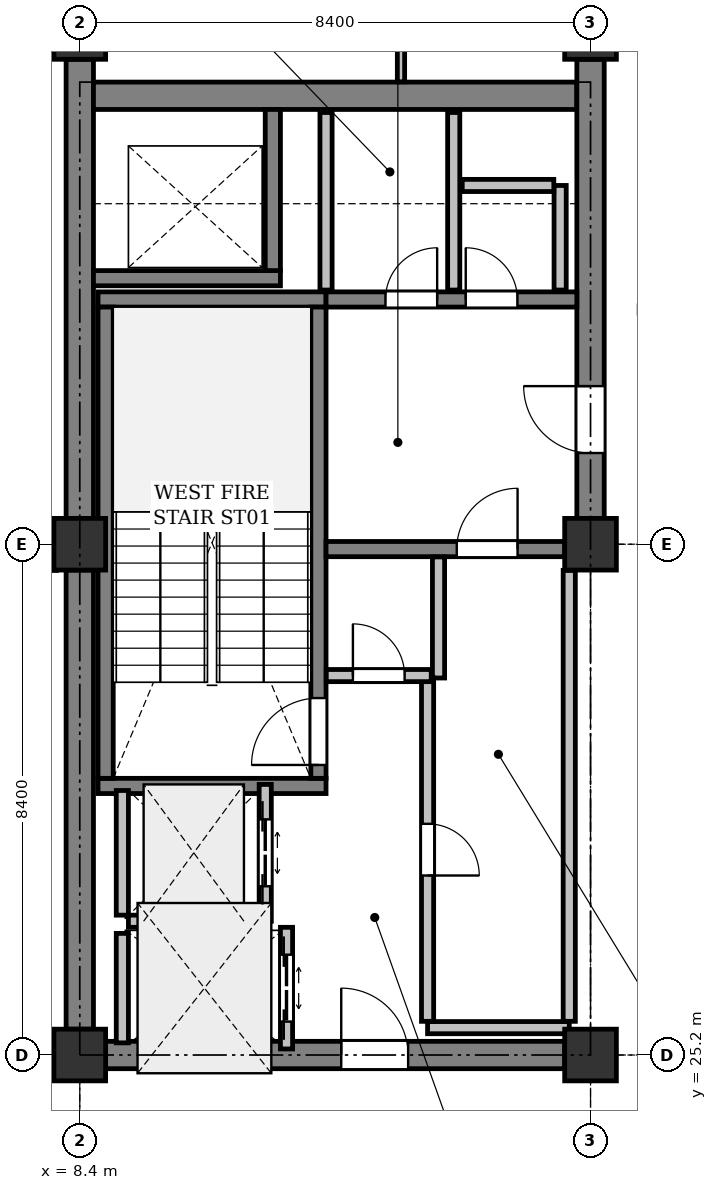
"""IFC4 building model, lengths in metres.
Left out: names, types, materials, properties, quantities, classifications, styles, units other than length and angle.
Written with IfcOpenShell. Run it as: python <this file> out.ifc"""

import sys

from ifc_helpers import new_model, si_unit, direction, frame, frame_2d, origin, origin_2d, place, context, subcontext, project, spatial, rectangle, extrude, element, fill, save


model = new_model("IFC4")
c1 = context("Model", 3, precision=1e-05, world=origin(), true_north=direction((0.0, 1.0)))
c2 = subcontext(c1, "Body", "Model", "MODEL_VIEW")
j1 = project(units=[si_unit("LENGTHUNIT", "METRE"), si_unit("PLANEANGLEUNIT", "RADIAN")], contexts=[c1])
p1 = place(None, origin())
s1 = spatial("IfcSite", under=j1, at=p1, CompositionType="ELEMENT")
p2 = place(p1, origin())
s2 = spatial("IfcBuilding", under=s1, at=p2, CompositionType="ELEMENT")
p3 = place(p2, frame((0.0, 0.0, 314.2)))
s3 = spatial("IfcBuildingStorey", under=s2, at=p3, CompositionType="ELEMENT", Elevation=314.2)
for number, where, z_axis, x_axis in (
    (1, (8.4, 25.2, 0.0), (0.0, 0.0, 1.0), (1.0, 0.0, 0.0)),
    (2, (8.4, 33.6, 0.0), (0.0, 0.0, 1.0), (1.0, 0.0, 0.0)),
    (3, (8.4, 42.0, 0.0), (0.0, 0.0, 1.0), (1.0, 0.0, 0.0)),
    (4, (16.8, 25.2, 0.0), (0.0, 0.0, 1.0), (1.0, 0.0, 0.0)),
    (5, (16.8, 33.6, 0.0), (0.0, 0.0, 1.0), (1.0, 0.0, 0.0)),
    (6, (16.8, 42.0, 0.0), (0.0, 0.0, 1.0), (1.0, 0.0, 0.0)),
):
    element("IfcColumn", number, at=place(p3, frame(where, z_axis=z_axis, x_axis=x_axis)), inside=s3, PredefinedType="COLUMN", context=c2, shape_type="SweptSolid", body=[
        extrude(rectangle(XDim=0.85, YDim=0.85, at=origin_2d()), origin(), (0.0, 0.0, 1.0), 4.0),
    ])
for number, where, z_axis, x_axis in (
    (7, (8.4, 25.625, 0.0), (0.0, 0.0, 1.0), (0.0, 1.0, 0.0)),
    (8, (8.4, 34.025, 0.0), (0.0, 0.0, 1.0), (0.0, 1.0, 0.0)),
):
    element("IfcWall", number, at=place(p3, frame(where, z_axis=z_axis, x_axis=x_axis)), inside=s3, PredefinedType="SHEAR", context=c2, shape_type="SweptSolid", body=[
        extrude(rectangle(XDim=7.55, YDim=0.45, at=frame_2d((3.775, 0.0))), origin(), (0.0, 0.0, 1.0), 3.725),
    ])
p4 = place(p3, frame((8.625, 40.975, 0.0), z_axis=(0.0, 0.0, 1.0), x_axis=(1.0, 0.0, 0.0)))
e9 = element("IfcWall", 9, at=p4, inside=s3, PredefinedType="SHEAR", context=c2, shape_type="SweptSolid", body=[
    extrude(rectangle(XDim=7.95, YDim=0.45, at=frame_2d((3.975, 0.0))), origin(), (0.0, 0.0, 1.0), 3.725),
])
p5 = place(p3, frame((16.8, 34.025, 0.0), z_axis=(0.0, 0.0, 1.0), x_axis=(0.0, 1.0, 0.0)))
e10 = element("IfcWall", 10, at=p5, inside=s3, PredefinedType="SHEAR", context=c2, shape_type="SweptSolid", body=[
    extrude(rectangle(XDim=7.55, YDim=0.45, at=frame_2d((3.775, 0.0))), origin(), (0.0, 0.0, 1.0), 3.725),
])
p6 = place(p5, frame((1.075, 0.0, 0.0)))
e11 = element("IfcOpeningElement", 11, at=p6, cuts=e10, PredefinedType="OPENING", context=c2, shape_type="SweptSolid", body=[
    extrude(rectangle(XDim=1.1, YDim=2.15, at=frame_2d((0.55, 1.075))), frame((0.0, 0.235, 0.0), z_axis=(0.0, -1.0, 0.0), x_axis=(1.0, 0.0, 0.0)), (0.0, 0.0, 1.0), 0.47),
])
p7 = place(p3, frame((8.825, 25.2, 0.0), z_axis=(0.0, 0.0, 1.0), x_axis=(1.0, 0.0, 0.0)))
e12 = element("IfcWall", 12, at=p7, inside=s3, PredefinedType="SHEAR", context=c2, shape_type="SweptSolid", body=[
    extrude(rectangle(XDim=7.55, YDim=0.45, at=frame_2d((3.775, 0.0))), origin(), (0.0, 0.0, 1.0), 3.725),
])
p8 = place(p7, frame((3.875, 0.0, 0.0)))
e13 = element("IfcOpeningElement", 13, at=p8, cuts=e12, PredefinedType="OPENING", context=c2, shape_type="SweptSolid", body=[
    extrude(rectangle(XDim=1.1, YDim=2.15, at=frame_2d((0.55, 1.075))), frame((0.0, 0.235, 0.0), z_axis=(0.0, -1.0, 0.0), x_axis=(1.0, 0.0, 0.0)), (0.0, 0.0, 1.0), 0.47),
])
for number, where, z_axis, x_axis in (
    (14, (12.45, 29.625, 0.0), (0.0, 0.0, 1.0), (-1.0, 0.0, 0.0)),
    (15, (12.45, 37.625, 0.0), (0.0, 0.0, 1.0), (-1.0, 0.0, 0.0)),
):
    element("IfcWall", number, at=place(p3, frame(where, z_axis=z_axis, x_axis=x_axis)), inside=s3, PredefinedType="SHEAR", context=c2, shape_type="SweptSolid", body=[
        extrude(rectangle(XDim=3.75, YDim=0.25, at=frame_2d((1.875, 0.0))), origin(), (0.0, 0.0, 1.0), 3.725),
    ])
p9 = place(p3, frame((12.325, 29.75, 0.0), z_axis=(0.0, 0.0, 1.0), x_axis=(0.0, 1.0, 0.0)))
e16 = element("IfcWall", 16, at=p9, inside=s3, PredefinedType="SHEAR", context=c2, shape_type="SweptSolid", body=[
    extrude(rectangle(XDim=7.75, YDim=0.25, at=frame_2d((3.875, 0.0))), origin(), (0.0, 0.0, 1.0), 3.725),
])
p10 = place(p9, frame((0.22, 0.0, 0.0)))
e17 = element("IfcOpeningElement", 17, at=p10, cuts=e16, PredefinedType="OPENING", context=c2, shape_type="SweptSolid", body=[
    extrude(rectangle(XDim=1.1, YDim=2.15, at=frame_2d((0.55, 1.075))), frame((0.0, 0.135, 0.0), z_axis=(0.0, -1.0, 0.0), x_axis=(1.0, 0.0, 0.0)), (0.0, 0.0, 1.0), 0.27),
])
p11 = place(p3, frame((8.825, 29.75, 0.0), z_axis=(0.0, 0.0, 1.0), x_axis=(0.0, 1.0, 0.0)))
e18 = element("IfcWall", 18, at=p11, inside=s3, PredefinedType="SHEAR", context=c2, shape_type="SweptSolid", body=[
    extrude(rectangle(XDim=7.75, YDim=0.25, at=frame_2d((3.875, 0.0))), origin(), (0.0, 0.0, 1.0), 3.725),
])
p12 = place(p3, frame((8.625, 37.975, 0.0), z_axis=(0.0, 0.0, 1.0), x_axis=(1.0, 0.0, 0.0)))
e19 = element("IfcWall", 19, at=p12, inside=s3, PredefinedType="SHEAR", context=c2, shape_type="SweptSolid", body=[
    extrude(rectangle(XDim=3.075, YDim=0.25, at=frame_2d((1.538, 0.0))), origin(), (0.0, 0.0, 1.0), 3.725),
])
p13 = place(p3, frame((11.575, 38.1, 0.0), z_axis=(0.0, 0.0, 1.0), x_axis=(0.0, 1.0, 0.0)))
e20 = element("IfcWall", 20, at=p13, inside=s3, PredefinedType="SHEAR", context=c2, shape_type="SweptSolid", body=[
    extrude(rectangle(XDim=2.65, YDim=0.25, at=frame_2d((1.325, 0.0))), origin(), (0.0, 0.0, 1.0), 3.725),
])
p14 = place(p3, frame((12.45, 33.52, 0.0), z_axis=(0.0, 0.0, 1.0), x_axis=(1.0, 0.0, 0.0)))
e21 = element("IfcWall", 21, at=p14, inside=s3, PredefinedType="SHEAR", context=c2, shape_type="SweptSolid", body=[
    extrude(rectangle(XDim=3.925, YDim=0.25, at=frame_2d((1.962, 0.0))), origin(), (0.0, 0.0, 1.0), 3.725),
])
p15 = place(p14, frame((2.15, 0.0, 0.0)))
e22 = element("IfcOpeningElement", 22, at=p15, cuts=e21, PredefinedType="OPENING", context=c2, shape_type="SweptSolid", body=[
    extrude(rectangle(XDim=1.0, YDim=2.15, at=frame_2d((0.5, 1.075))), frame((0.0, 0.135, 0.0), z_axis=(0.0, -1.0, 0.0), x_axis=(1.0, 0.0, 0.0)), (0.0, 0.0, 1.0), 0.27),
])
p16 = place(p3, frame((12.45, 37.625, 0.0), z_axis=(0.0, 0.0, 1.0), x_axis=(1.0, 0.0, 0.0)))
e23 = element("IfcWall", 23, at=p16, inside=s3, PredefinedType="SHEAR", context=c2, shape_type="SweptSolid", body=[
    extrude(rectangle(XDim=4.125, YDim=0.25, at=frame_2d((2.062, 0.0))), origin(), (0.0, 0.0, 1.0), 3.725),
])
p17 = place(p16, frame((0.978, 0.0, 0.0)))
e24 = element("IfcOpeningElement", 24, at=p17, cuts=e23, PredefinedType="OPENING", context=c2, shape_type="SweptSolid", body=[
    extrude(rectangle(XDim=0.85, YDim=2.15, at=frame_2d((0.425, 1.075))), frame((0.0, 0.135, 0.0), z_axis=(0.0, -1.0, 0.0), x_axis=(1.0, 0.0, 0.0)), (0.0, 0.0, 1.0), 0.27),
])
p18 = place(p16, frame((2.298, 0.0, 0.0)))
e25 = element("IfcOpeningElement", 25, at=p18, cuts=e23, PredefinedType="OPENING", context=c2, shape_type="SweptSolid", body=[
    extrude(rectangle(XDim=0.85, YDim=2.15, at=frame_2d((0.425, 1.075))), frame((0.0, 0.135, 0.0), z_axis=(0.0, -1.0, 0.0), x_axis=(1.0, 0.0, 0.0)), (0.0, 0.0, 1.0), 0.27),
])
p19 = place(p3, frame((11.45, 27.4, 0.0), z_axis=(0.0, 0.0, 1.0), x_axis=(0.0, 1.0, 0.0)))
e26 = element("IfcWall", 26, at=p19, inside=s3, PredefinedType="PARTITIONING", context=c2, shape_type="SweptSolid", body=[
    extrude(rectangle(XDim=2.25, YDim=0.2, at=frame_2d((1.125, 0.0))), origin(), (0.0, 0.0, 1.0), 3.725),
])
p20 = place(p19, frame((0.575, 0.0, 0.0)))
e27 = element("IfcOpeningElement", 27, at=p20, cuts=e26, PredefinedType="OPENING", context=c2, shape_type="SweptSolid", body=[
    extrude(rectangle(XDim=1.1, YDim=2.2, at=frame_2d((0.55, 1.1))), frame((0.0, 0.11, 0.0), z_axis=(0.0, -1.0, 0.0), x_axis=(1.0, 0.0, 0.0)), (0.0, 0.0, 1.0), 0.22),
])
p21 = place(p3, frame((9.1, 27.5, 0.0), z_axis=(0.0, 0.0, 1.0), x_axis=(0.0, 1.0, 0.0)))
e28 = element("IfcWall", 28, at=p21, inside=s3, PredefinedType="PARTITIONING", context=c2, shape_type="SweptSolid", body=[
    extrude(rectangle(XDim=2.05, YDim=0.2, at=frame_2d((1.025, 0.0))), origin(), (0.0, 0.0, 1.0), 3.725),
])
p22 = place(p3, frame((9.2, 27.4, 0.0), z_axis=(0.0, 0.0, 1.0), x_axis=(1.0, 0.0, 0.0)))
e29 = element("IfcWall", 29, at=p22, inside=s3, PredefinedType="PARTITIONING", context=c2, shape_type="SweptSolid", body=[
    extrude(rectangle(XDim=2.15, YDim=0.2, at=frame_2d((1.075, 0.0))), origin(), (0.0, 0.0, 1.0), 3.725),
])
p23 = place(p3, frame((11.8, 25.3, 0.0), z_axis=(0.0, 0.0, 1.0), x_axis=(0.0, 1.0, 0.0)))
e30 = element("IfcWall", 30, at=p23, inside=s3, PredefinedType="PARTITIONING", context=c2, shape_type="SweptSolid", body=[
    extrude(rectangle(XDim=2.0, YDim=0.2, at=frame_2d((1.0, 0.0))), origin(), (0.0, 0.0, 1.0), 3.725),
])
p24 = place(p23, frame((0.45, 0.0, 0.0)))
e31 = element("IfcOpeningElement", 31, at=p24, cuts=e30, PredefinedType="OPENING", context=c2, shape_type="SweptSolid", body=[
    extrude(rectangle(XDim=1.1, YDim=2.2, at=frame_2d((0.55, 1.1))), frame((0.0, 0.11, 0.0), z_axis=(0.0, -1.0, 0.0), x_axis=(1.0, 0.0, 0.0)), (0.0, 0.0, 1.0), 0.22),
])
p25 = place(p3, frame((9.1, 25.4, 0.0), z_axis=(0.0, 0.0, 1.0), x_axis=(0.0, 1.0, 0.0)))
e32 = element("IfcWall", 32, at=p25, inside=s3, PredefinedType="PARTITIONING", context=c2, shape_type="SweptSolid", body=[
    extrude(rectangle(XDim=1.8, YDim=0.2, at=frame_2d((0.9, 0.0))), origin(), (0.0, 0.0, 1.0), 3.725),
])
p26 = place(p3, frame((14.12, 25.65, 0.0), z_axis=(0.0, 0.0, 1.0), x_axis=(1.0, 0.0, 0.0)))
e33 = element("IfcWall", 33, at=p26, inside=s3, PredefinedType="PARTITIONING", context=c2, shape_type="SweptSolid", body=[
    extrude(rectangle(XDim=2.33, YDim=0.2, at=frame_2d((1.165, 0.0))), origin(), (0.0, 0.0, 1.0), 3.725),
])
p27 = place(p3, frame((16.45, 25.754, 0.0), z_axis=(0.0, 0.0, 1.0), x_axis=(0.0, 1.0, 0.0)))
e34 = element("IfcWall", 34, at=p27, inside=s3, PredefinedType="PARTITIONING", context=c2, shape_type="SweptSolid", body=[
    extrude(rectangle(XDim=7.416, YDim=0.2, at=frame_2d((3.708, 0.0))), origin(), (0.0, 0.0, 1.0), 3.725),
])
p28 = place(p3, frame((14.3, 33.391, 0.0), z_axis=(0.0, 0.0, 1.0), x_axis=(0.0, -1.0, 0.0)))
e35 = element("IfcWall", 35, at=p28, inside=s3, PredefinedType="PARTITIONING", context=c2, shape_type="SweptSolid", body=[
    extrude(rectangle(XDim=1.991, YDim=0.2, at=frame_2d((0.996, 0.0))), origin(), (0.0, 0.0, 1.0), 3.725),
])
p29 = place(p3, frame((14.12, 31.4, 0.0), z_axis=(0.0, 0.0, 1.0), x_axis=(0.0, -1.0, 0.0)))
e36 = element("IfcWall", 36, at=p29, inside=s3, PredefinedType="PARTITIONING", context=c2, shape_type="SweptSolid", body=[
    extrude(rectangle(XDim=5.646, YDim=0.2, at=frame_2d((2.823, 0.0))), origin(), (0.0, 0.0, 1.0), 3.725),
])
p30 = place(p29, frame((2.398, 0.0, 0.0)))
e37 = element("IfcOpeningElement", 37, at=p30, cuts=e36, PredefinedType="OPENING", context=c2, shape_type="SweptSolid", body=[
    extrude(rectangle(XDim=0.85, YDim=2.15, at=frame_2d((0.425, 1.075))), frame((0.0, 0.11, 0.0), z_axis=(0.0, -1.0, 0.0), x_axis=(1.0, 0.0, 0.0)), (0.0, 0.0, 1.0), 0.22),
])
p31 = place(p3, frame((12.454, 31.44, 0.0), z_axis=(0.0, 0.0, 1.0), x_axis=(1.0, 0.0, 0.0)))
e38 = element("IfcWall", 38, at=p31, inside=s3, PredefinedType="PARTITIONING", context=c2, shape_type="SweptSolid", body=[
    extrude(rectangle(XDim=1.726, YDim=0.2, at=frame_2d((0.863, 0.0))), origin(), (0.0, 0.0, 1.0), 3.725),
])
p32 = place(p31, frame((0.438, 0.0, 0.0)))
e39 = element("IfcOpeningElement", 39, at=p32, cuts=e38, PredefinedType="OPENING", context=c2, shape_type="SweptSolid", body=[
    extrude(rectangle(XDim=0.85, YDim=2.15, at=frame_2d((0.425, 1.075))), frame((0.0, 0.11, 0.0), z_axis=(0.0, -1.0, 0.0), x_axis=(1.0, 0.0, 0.0)), (0.0, 0.0, 1.0), 0.22),
])
for number, where, z_axis, x_axis in (
    (40, (14.55, 37.78, 0.0), (0.0, 0.0, 1.0), (0.0, 1.0, 0.0)),
    (41, (12.45, 40.7, 0.0), (0.0, 0.0, 1.0), (0.0, -1.0, 0.0)),
):
    element("IfcWall", number, at=place(p3, frame(where, z_axis=z_axis, x_axis=x_axis)), inside=s3, PredefinedType="PARTITIONING", context=c2, shape_type="SweptSolid", body=[
        extrude(rectangle(XDim=2.92, YDim=0.2, at=frame_2d((1.46, 0.0))), origin(), (0.0, 0.0, 1.0), 2.775),
    ])
p33 = place(p3, frame((16.3, 37.78, 0.0), z_axis=(0.0, 0.0, 1.0), x_axis=(0.0, 1.0, 0.0)))
e42 = element("IfcWall", 42, at=p33, inside=s3, PredefinedType="PARTITIONING", context=c2, shape_type="SweptSolid", body=[
    extrude(rectangle(XDim=1.72, YDim=0.2, at=frame_2d((0.86, 0.0))), origin(), (0.0, 0.0, 1.0), 2.775),
])
p34 = place(p3, frame((16.196, 39.5, 0.0), z_axis=(0.0, 0.0, 1.0), x_axis=(-1.0, 0.0, 0.0)))
e43 = element("IfcWall", 43, at=p34, inside=s3, PredefinedType="PARTITIONING", context=c2, shape_type="SweptSolid", body=[
    extrude(rectangle(XDim=1.506, YDim=0.2, at=frame_2d((0.753, 0.0))), origin(), (0.0, 0.0, 1.0), 2.775),
])
p35 = place(p3, frame((13.683, 41.831, 0.0), z_axis=(0.0, 0.0, 1.0), x_axis=(0.0, -1.0, 0.0)))
e44 = element("IfcWall", 44, at=p35, inside=s3, PredefinedType="PARTITIONING", context=c2, shape_type="SweptSolid", body=[
    extrude(rectangle(XDim=0.627, YDim=0.12, at=frame_2d((0.313, 0.0))), origin(), (0.0, 0.0, 1.0), 3.725),
])
p36 = place(p3, frame((5.4, 25.26, 0.0), z_axis=(0.0, 0.0, 1.0), x_axis=(1.0, 0.0, 0.0)))
e45 = element("IfcWall", 45, at=p36, inside=s3, PredefinedType="PARTITIONING", context=c2, shape_type="SweptSolid", body=[
    extrude(rectangle(XDim=2.555, YDim=0.12, at=frame_2d((1.278, 0.0))), origin(), (0.0, 0.0, 1.0), 3.271),
])
p37 = place(p36, frame((0.802, 0.0, 0.0)))
e46 = element("IfcOpeningElement", 46, at=p37, cuts=e45, PredefinedType="OPENING", context=c2, shape_type="SweptSolid", body=[
    extrude(rectangle(XDim=0.95, YDim=2.15, at=frame_2d((0.475, 1.075))), frame((0.0, 0.07, 0.0), z_axis=(0.0, -1.0, 0.0), x_axis=(1.0, 0.0, 0.0)), (0.0, 0.0, 1.0), 0.14),
])
p38 = place(p3, frame((7.956, 33.169, 0.0), z_axis=(0.0, 0.0, 1.0), x_axis=(-0.000855919801, 0.999999633701, 0.0)))
e47 = element("IfcWall", 47, at=p38, inside=s3, PredefinedType="PARTITIONING", context=c2, shape_type="SweptSolid", body=[
    extrude(rectangle(XDim=0.856, YDim=0.12, at=frame_2d((0.428, 0.0))), origin(), (0.0, 0.0, 1.0), 3.271),
])
p39 = place(p6, origin())
e48 = element("IfcDoor", 48, at=p39, inside=s3, OperationType="SINGLE_SWING_LEFT", PredefinedType="DOOR", context=c2, shape_type="SweptSolid", body=[
    extrude(rectangle(XDim=1.1, YDim=2.15, at=frame_2d((0.55, 1.075))), frame((0.0, 0.025, 0.0), z_axis=(0.0, -1.0, 0.0), x_axis=(1.0, 0.0, 0.0)), (0.0, 0.0, 1.0), 0.05),
])
fill(e11, e48)
p40 = place(p8, origin())
e49 = element("IfcDoor", 49, at=p40, inside=s3, OperationType="SINGLE_SWING_RIGHT", PredefinedType="DOOR", context=c2, shape_type="SweptSolid", body=[
    extrude(rectangle(XDim=1.1, YDim=2.15, at=frame_2d((0.55, 1.075))), frame((0.0, 0.025, 0.0), z_axis=(0.0, -1.0, 0.0), x_axis=(1.0, 0.0, 0.0)), (0.0, 0.0, 1.0), 0.05),
])
fill(e13, e49)
p41 = place(p10, origin())
e50 = element("IfcDoor", 50, at=p41, inside=s3, OperationType="SINGLE_SWING_RIGHT", PredefinedType="DOOR", context=c2, shape_type="SweptSolid", body=[
    extrude(rectangle(XDim=1.1, YDim=2.15, at=frame_2d((0.55, 1.075))), frame((0.0, 0.025, 0.0), z_axis=(0.0, -1.0, 0.0), x_axis=(1.0, 0.0, 0.0)), (0.0, 0.0, 1.0), 0.05),
])
fill(e17, e50)
p42 = place(p15, origin())
e51 = element("IfcDoor", 51, at=p42, inside=s3, OperationType="SINGLE_SWING_RIGHT", PredefinedType="DOOR", context=c2, shape_type="SweptSolid", body=[
    extrude(rectangle(XDim=1.0, YDim=2.15, at=frame_2d((0.5, 1.075))), frame((0.0, 0.025, 0.0), z_axis=(0.0, -1.0, 0.0), x_axis=(1.0, 0.0, 0.0)), (0.0, 0.0, 1.0), 0.05),
])
fill(e22, e51)
p43 = place(p20, origin())
e52 = element("IfcDoor", 52, at=p43, inside=s3, OperationType="DOUBLE_DOOR_SLIDING", PredefinedType="DOOR", context=c2, shape_type="SweptSolid", body=[
    extrude(rectangle(XDim=1.1, YDim=2.2, at=frame_2d((0.55, 1.1))), frame((0.0, 0.025, 0.0), z_axis=(0.0, -1.0, 0.0), x_axis=(1.0, 0.0, 0.0)), (0.0, 0.0, 1.0), 0.05),
])
fill(e27, e52)
p44 = place(p24, origin())
e53 = element("IfcDoor", 53, at=p44, inside=s3, OperationType="DOUBLE_DOOR_SLIDING", PredefinedType="DOOR", context=c2, shape_type="SweptSolid", body=[
    extrude(rectangle(XDim=1.1, YDim=2.2, at=frame_2d((0.55, 1.1))), frame((0.0, 0.025, 0.0), z_axis=(0.0, -1.0, 0.0), x_axis=(1.0, 0.0, 0.0)), (0.0, 0.0, 1.0), 0.05),
])
fill(e31, e53)
p45 = place(p30, origin())
e54 = element("IfcDoor", 54, at=p45, inside=s3, OperationType="SINGLE_SWING_RIGHT", PredefinedType="DOOR", context=c2, shape_type="SweptSolid", body=[
    extrude(rectangle(XDim=0.85, YDim=2.15, at=frame_2d((0.425, 1.075))), frame((0.0, 0.025, 0.0), z_axis=(0.0, -1.0, 0.0), x_axis=(1.0, 0.0, 0.0)), (0.0, 0.0, 1.0), 0.05),
])
fill(e37, e54)
p46 = place(p32, origin())
e55 = element("IfcDoor", 55, at=p46, inside=s3, OperationType="SINGLE_SWING_LEFT", PredefinedType="DOOR", context=c2, shape_type="SweptSolid", body=[
    extrude(rectangle(XDim=0.85, YDim=2.15, at=frame_2d((0.425, 1.075))), frame((0.0, 0.025, 0.0), z_axis=(0.0, -1.0, 0.0), x_axis=(1.0, 0.0, 0.0)), (0.0, 0.0, 1.0), 0.05),
])
fill(e39, e55)
p47 = place(p17, origin())
e56 = element("IfcDoor", 56, at=p47, inside=s3, OperationType="SINGLE_SWING_RIGHT", PredefinedType="DOOR", context=c2, shape_type="SweptSolid", body=[
    extrude(rectangle(XDim=0.85, YDim=2.15, at=frame_2d((0.425, 1.075))), frame((0.0, 0.025, 0.0), z_axis=(0.0, -1.0, 0.0), x_axis=(1.0, 0.0, 0.0)), (0.0, 0.0, 1.0), 0.05),
])
fill(e24, e56)
p48 = place(p18, origin())
e57 = element("IfcDoor", 57, at=p48, inside=s3, OperationType="SINGLE_SWING_LEFT", PredefinedType="DOOR", context=c2, shape_type="SweptSolid", body=[
    extrude(rectangle(XDim=0.85, YDim=2.15, at=frame_2d((0.425, 1.075))), frame((0.0, 0.025, 0.0), z_axis=(0.0, -1.0, 0.0), x_axis=(1.0, 0.0, 0.0)), (0.0, 0.0, 1.0), 0.05),
])
fill(e25, e57)
save(model, sys.argv[1])
